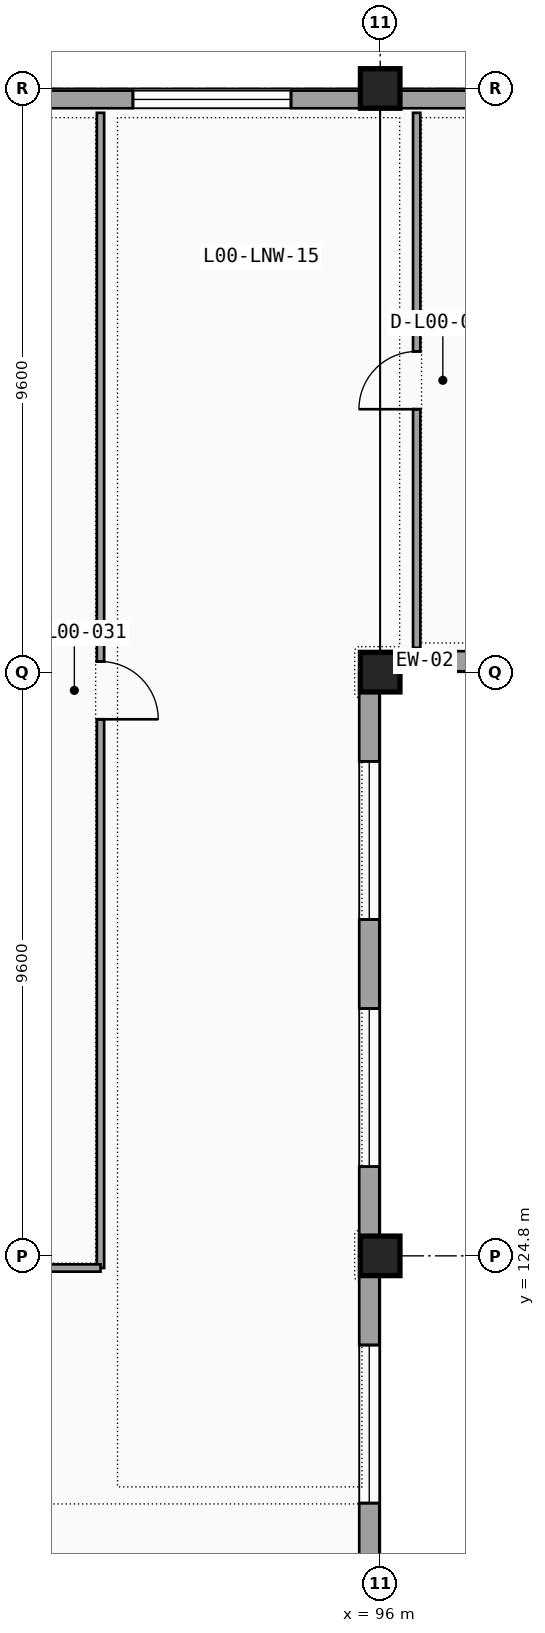
"""IFC4 building model, lengths in metres.
Left out: names, types, materials, properties, quantities, classifications, styles, units other than length and angle.
Written with IfcOpenShell. Run it as: python <this file> out.ifc"""

import sys

from ifc_helpers import new_model, si_unit, direction, frame, frame_2d, origin, origin_2d, place, context, subcontext, project, spatial, rectangle, extrude, element, fill, save


model = new_model("IFC4")
c1 = context("Model", 3, precision=1e-05, world=origin(), true_north=direction((0.0, 1.0)))
c2 = subcontext(c1, "Body", "Model", "MODEL_VIEW")
j1 = project(units=[si_unit("LENGTHUNIT", "METRE"), si_unit("PLANEANGLEUNIT", "RADIAN")], contexts=[c1])
p1 = place(None, origin())
s1 = spatial("IfcSite", under=j1, at=p1, CompositionType="ELEMENT")
p2 = place(p1, origin())
s2 = spatial("IfcBuilding", under=s1, at=p2, CompositionType="ELEMENT")
p3 = place(p2, origin())
s3 = spatial("IfcBuildingStorey", under=s2, at=p3, CompositionType="ELEMENT", Elevation=0.0)
for number, where, z_axis, x_axis in (
    (1, (96.0, 124.8, 0.0), (0.0, 0.0, 1.0), (1.0, 0.0, 0.0)),
    (2, (96.0, 134.4, 0.0), (0.0, 0.0, 1.0), (1.0, 0.0, 0.0)),
    (3, (96.0, 144.0, 0.0), (0.0, 0.0, 1.0), (1.0, 0.0, 0.0)),
):
    element("IfcColumn", number, at=place(p3, frame(where, z_axis=z_axis, x_axis=x_axis)), inside=s3, PredefinedType="COLUMN", context=c2, shape_type="SweptSolid", body=[
        extrude(rectangle(XDim=0.65, YDim=0.65, at=origin_2d()), origin(), (0.0, 0.0, 1.0), 4.8),
    ])
p4 = place(p3, frame((105.6, 143.82, 0.0), z_axis=(0.0, 0.0, 1.0), x_axis=(-1.0, 0.0, 0.0)))
e4 = element("IfcWall", 4, at=p4, inside=s3, PredefinedType="SOLIDWALL", context=c2, shape_type="SweptSolid", body=[
    extrude(rectangle(XDim=9.6, YDim=0.29, at=frame_2d((4.8, 0.0))), origin(), (0.0, 0.0, 1.0), 3.573),
])
p5 = place(p4, frame((4.067, 0.0, 1.0), z_axis=(0.0, 0.0, 1.0), x_axis=(-1.0, 0.0, 0.0)))
e5 = element("IfcOpeningElement", 5, at=p5, cuts=e4, PredefinedType="OPENING", context=c2, shape_type="SweptSolid", body=[
    extrude(rectangle(XDim=2.6, YDim=2.0, at=frame_2d((1.3, 1.0))), frame((0.0, 0.155, 0.0), z_axis=(0.0, -1.0, 0.0), x_axis=(1.0, 0.0, 0.0)), (0.0, 0.0, 1.0), 0.31),
])
p6 = place(p4, frame((8.133, 0.0, 1.0), z_axis=(0.0, 0.0, 1.0), x_axis=(-1.0, 0.0, 0.0)))
e6 = element("IfcOpeningElement", 6, at=p6, cuts=e4, PredefinedType="OPENING", context=c2, shape_type="SweptSolid", body=[
    extrude(rectangle(XDim=2.6, YDim=2.0, at=frame_2d((1.3, 1.0))), frame((0.0, 0.155, 0.0), z_axis=(0.0, -1.0, 0.0), x_axis=(1.0, 0.0, 0.0)), (0.0, 0.0, 1.0), 0.31),
])
p7 = place(p3, frame((96.0, 143.82, 0.0), z_axis=(0.0, 0.0, 1.0), x_axis=(-1.0, 0.0, 0.0)))
e7 = element("IfcWall", 7, at=p7, inside=s3, PredefinedType="SOLIDWALL", context=c2, shape_type="SweptSolid", body=[
    extrude(rectangle(XDim=9.6, YDim=0.29, at=frame_2d((4.8, 0.0))), origin(), (0.0, 0.0, 1.0), 3.573),
])
p8 = place(p7, frame((4.067, 0.0, 1.0), z_axis=(0.0, 0.0, 1.0), x_axis=(-1.0, 0.0, 0.0)))
e8 = element("IfcOpeningElement", 8, at=p8, cuts=e7, PredefinedType="OPENING", context=c2, shape_type="SweptSolid", body=[
    extrude(rectangle(XDim=2.6, YDim=2.0, at=frame_2d((1.3, 1.0))), frame((0.0, 0.155, 0.0), z_axis=(0.0, -1.0, 0.0), x_axis=(1.0, 0.0, 0.0)), (0.0, 0.0, 1.0), 0.31),
])
p9 = place(p7, frame((8.133, 0.0, 1.0), z_axis=(0.0, 0.0, 1.0), x_axis=(-1.0, 0.0, 0.0)))
e9 = element("IfcOpeningElement", 9, at=p9, cuts=e7, PredefinedType="OPENING", context=c2, shape_type="SweptSolid", body=[
    extrude(rectangle(XDim=2.6, YDim=2.0, at=frame_2d((1.3, 1.0))), frame((0.0, 0.155, 0.0), z_axis=(0.0, -1.0, 0.0), x_axis=(1.0, 0.0, 0.0)), (0.0, 0.0, 1.0), 0.31),
])
p10 = place(p3, frame((96.0, 134.58, 0.0), z_axis=(0.0, 0.0, 1.0), x_axis=(1.0, 0.0, 0.0)))
e10 = element("IfcWall", 10, at=p10, inside=s3, PredefinedType="SOLIDWALL", context=c2, shape_type="SweptSolid", body=[
    extrude(rectangle(XDim=9.6, YDim=0.33, at=frame_2d((4.8, 0.0))), origin(), (0.0, 0.0, 1.0), 3.664),
])
p11 = place(p10, frame((4.067, 0.0, 1.0), z_axis=(0.0, 0.0, 1.0), x_axis=(-1.0, 0.0, 0.0)))
e11 = element("IfcOpeningElement", 11, at=p11, cuts=e10, PredefinedType="OPENING", context=c2, shape_type="SweptSolid", body=[
    extrude(rectangle(XDim=2.6, YDim=2.0, at=frame_2d((1.3, 1.0))), frame((0.0, 0.175, 0.0), z_axis=(0.0, -1.0, 0.0), x_axis=(1.0, 0.0, 0.0)), (0.0, 0.0, 1.0), 0.35),
])
p12 = place(p10, frame((8.133, 0.0, 1.0), z_axis=(0.0, 0.0, 1.0), x_axis=(-1.0, 0.0, 0.0)))
e12 = element("IfcOpeningElement", 12, at=p12, cuts=e10, PredefinedType="OPENING", context=c2, shape_type="SweptSolid", body=[
    extrude(rectangle(XDim=2.6, YDim=2.0, at=frame_2d((1.3, 1.0))), frame((0.0, 0.175, 0.0), z_axis=(0.0, -1.0, 0.0), x_axis=(1.0, 0.0, 0.0)), (0.0, 0.0, 1.0), 0.35),
])
p13 = place(p3, frame((95.82, 115.2, 0.0), z_axis=(0.0, 0.0, 1.0), x_axis=(0.0, 1.0, 0.0)))
e13 = element("IfcWall", 13, at=p13, inside=s3, PredefinedType="SOLIDWALL", context=c2, shape_type="SweptSolid", body=[
    extrude(rectangle(XDim=9.6, YDim=0.33, at=frame_2d((4.8, 0.0))), origin(), (0.0, 0.0, 1.0), 3.573),
])
p14 = place(p13, frame((4.067, 0.0, 1.0), z_axis=(0.0, 0.0, 1.0), x_axis=(-1.0, 0.0, 0.0)))
e14 = element("IfcOpeningElement", 14, at=p14, cuts=e13, PredefinedType="OPENING", context=c2, shape_type="SweptSolid", body=[
    extrude(rectangle(XDim=2.6, YDim=2.0, at=frame_2d((1.3, 1.0))), frame((0.0, 0.175, 0.0), z_axis=(0.0, -1.0, 0.0), x_axis=(1.0, 0.0, 0.0)), (0.0, 0.0, 1.0), 0.35),
])
p15 = place(p13, frame((8.133, 0.0, 1.0), z_axis=(0.0, 0.0, 1.0), x_axis=(-1.0, 0.0, 0.0)))
e15 = element("IfcOpeningElement", 15, at=p15, cuts=e13, PredefinedType="OPENING", context=c2, shape_type="SweptSolid", body=[
    extrude(rectangle(XDim=2.6, YDim=2.0, at=frame_2d((1.3, 1.0))), frame((0.0, 0.175, 0.0), z_axis=(0.0, -1.0, 0.0), x_axis=(1.0, 0.0, 0.0)), (0.0, 0.0, 1.0), 0.35),
])
p16 = place(p3, frame((95.82, 124.8, 0.0), z_axis=(0.0, 0.0, 1.0), x_axis=(0.0, 1.0, 0.0)))
e16 = element("IfcWall", 16, at=p16, inside=s3, PredefinedType="SOLIDWALL", context=c2, shape_type="SweptSolid", body=[
    extrude(rectangle(XDim=9.6, YDim=0.33, at=frame_2d((4.8, 0.0))), origin(), (0.0, 0.0, 1.0), 3.7),
])
p17 = place(p16, frame((4.067, 0.0, 1.0), z_axis=(0.0, 0.0, 1.0), x_axis=(-1.0, 0.0, 0.0)))
e17 = element("IfcOpeningElement", 17, at=p17, cuts=e16, PredefinedType="OPENING", context=c2, shape_type="SweptSolid", body=[
    extrude(rectangle(XDim=2.6, YDim=2.0, at=frame_2d((1.3, 1.0))), frame((0.0, 0.175, 0.0), z_axis=(0.0, -1.0, 0.0), x_axis=(1.0, 0.0, 0.0)), (0.0, 0.0, 1.0), 0.35),
])
p18 = place(p16, frame((8.133, 0.0, 1.0), z_axis=(0.0, 0.0, 1.0), x_axis=(-1.0, 0.0, 0.0)))
e18 = element("IfcOpeningElement", 18, at=p18, cuts=e16, PredefinedType="OPENING", context=c2, shape_type="SweptSolid", body=[
    extrude(rectangle(XDim=2.6, YDim=2.0, at=frame_2d((1.3, 1.0))), frame((0.0, 0.175, 0.0), z_axis=(0.0, -1.0, 0.0), x_axis=(1.0, 0.0, 0.0)), (0.0, 0.0, 1.0), 0.35),
])
p19 = place(p3, frame((91.4, 143.6, 0.0), z_axis=(0.0, 0.0, 1.0), x_axis=(0.0, -1.0, 0.0)))
e19 = element("IfcWall", 19, at=p19, inside=s3, PredefinedType="PARTITIONING", context=c2, shape_type="SweptSolid", body=[
    extrude(rectangle(XDim=19.0, YDim=0.12, at=frame_2d((9.5, 0.0))), origin(), (0.0, 0.0, 1.0), 3.664),
])
p20 = place(p19, frame((9.025, 0.0, 0.0), z_axis=(0.0, 0.0, 1.0), x_axis=(1.0, 0.0, 0.0)))
e20 = element("IfcOpeningElement", 20, at=p20, cuts=e19, PredefinedType="OPENING", context=c2, shape_type="SweptSolid", body=[
    extrude(rectangle(XDim=0.95, YDim=2.15, at=frame_2d((0.475, 1.075))), frame((0.0, 0.07, 0.0), z_axis=(0.0, -1.0, 0.0), x_axis=(1.0, 0.0, 0.0)), (0.0, 0.0, 1.0), 0.14),
])
p21 = place(p3, frame((91.4, 124.6, 0.0), z_axis=(0.0, 0.0, 1.0), x_axis=(-1.0, 0.0, 0.0)))
e21 = element("IfcWall", 21, at=p21, inside=s3, PredefinedType="PARTITIONING", context=c2, shape_type="SweptSolid", body=[
    extrude(rectangle(XDim=4.64, YDim=0.12, at=frame_2d((2.32, 0.0))), origin(), (0.0, 0.0, 1.0), 3.664),
])
p22 = place(p3, frame((96.6, 134.8, 0.0), z_axis=(0.0, 0.0, 1.0), x_axis=(0.0, 1.0, 0.0)))
e22 = element("IfcWall", 22, at=p22, inside=s3, PredefinedType="PARTITIONING", context=c2, shape_type="SweptSolid", body=[
    extrude(rectangle(XDim=8.8, YDim=0.12, at=frame_2d((4.4, 0.0))), origin(), (0.0, 0.0, 1.0), 3.972),
])
p23 = place(p22, frame((3.925, 0.0, 0.0), z_axis=(0.0, 0.0, 1.0), x_axis=(1.0, 0.0, 0.0)))
e23 = element("IfcOpeningElement", 23, at=p23, cuts=e22, PredefinedType="OPENING", context=c2, shape_type="SweptSolid", body=[
    extrude(rectangle(XDim=0.95, YDim=2.15, at=frame_2d((0.475, 1.075))), frame((0.0, 0.07, 0.0), z_axis=(0.0, -1.0, 0.0), x_axis=(1.0, 0.0, 0.0)), (0.0, 0.0, 1.0), 0.14),
])
p24 = place(p8, origin())
e24 = element("IfcWindow", 24, at=p24, inside=s3, PartitioningType="SINGLE_PANEL", PredefinedType="WINDOW", context=c2, shape_type="SweptSolid", body=[
    extrude(rectangle(XDim=2.6, YDim=2.0, at=frame_2d((1.3, 1.0))), frame((0.0, 0.03, 0.0), z_axis=(0.0, -1.0, 0.0), x_axis=(1.0, 0.0, 0.0)), (0.0, 0.0, 1.0), 0.06),
])
fill(e8, e24)
p25 = place(p15, origin())
e25 = element("IfcWindow", 25, at=p25, inside=s3, PartitioningType="SINGLE_PANEL", PredefinedType="WINDOW", context=c2, shape_type="SweptSolid", body=[
    extrude(rectangle(XDim=2.6, YDim=2.0, at=frame_2d((1.3, 1.0))), frame((0.0, 0.03, 0.0), z_axis=(0.0, -1.0, 0.0), x_axis=(1.0, 0.0, 0.0)), (0.0, 0.0, 1.0), 0.06),
])
fill(e15, e25)
p26 = place(p17, origin())
e26 = element("IfcWindow", 26, at=p26, inside=s3, PartitioningType="SINGLE_PANEL", PredefinedType="WINDOW", context=c2, shape_type="SweptSolid", body=[
    extrude(rectangle(XDim=2.6, YDim=2.0, at=frame_2d((1.3, 1.0))), frame((0.0, 0.03, 0.0), z_axis=(0.0, -1.0, 0.0), x_axis=(1.0, 0.0, 0.0)), (0.0, 0.0, 1.0), 0.06),
])
fill(e17, e26)
p27 = place(p18, origin())
e27 = element("IfcWindow", 27, at=p27, inside=s3, PartitioningType="SINGLE_PANEL", PredefinedType="WINDOW", context=c2, shape_type="SweptSolid", body=[
    extrude(rectangle(XDim=2.6, YDim=2.0, at=frame_2d((1.3, 1.0))), frame((0.0, 0.03, 0.0), z_axis=(0.0, -1.0, 0.0), x_axis=(1.0, 0.0, 0.0)), (0.0, 0.0, 1.0), 0.06),
])
fill(e18, e27)
p28 = place(p20, origin())
e28 = element("IfcDoor", 28, at=p28, inside=s3, OperationType="SINGLE_SWING_RIGHT", PredefinedType="DOOR", context=c2, shape_type="SweptSolid", body=[
    extrude(rectangle(XDim=0.95, YDim=2.15, at=frame_2d((0.475, 1.075))), frame((0.0, 0.025, 0.0), z_axis=(0.0, -1.0, 0.0), x_axis=(1.0, 0.0, 0.0)), (0.0, 0.0, 1.0), 0.05),
])
fill(e20, e28)
p29 = place(p23, origin())
e29 = element("IfcDoor", 29, at=p29, inside=s3, OperationType="SINGLE_SWING_LEFT", PredefinedType="DOOR", context=c2, shape_type="SweptSolid", body=[
    extrude(rectangle(XDim=0.95, YDim=2.15, at=frame_2d((0.475, 1.075))), frame((0.0, 0.025, 0.0), z_axis=(0.0, -1.0, 0.0), x_axis=(1.0, 0.0, 0.0)), (0.0, 0.0, 1.0), 0.05),
])
fill(e23, e29)
save(model, sys.argv[1])
